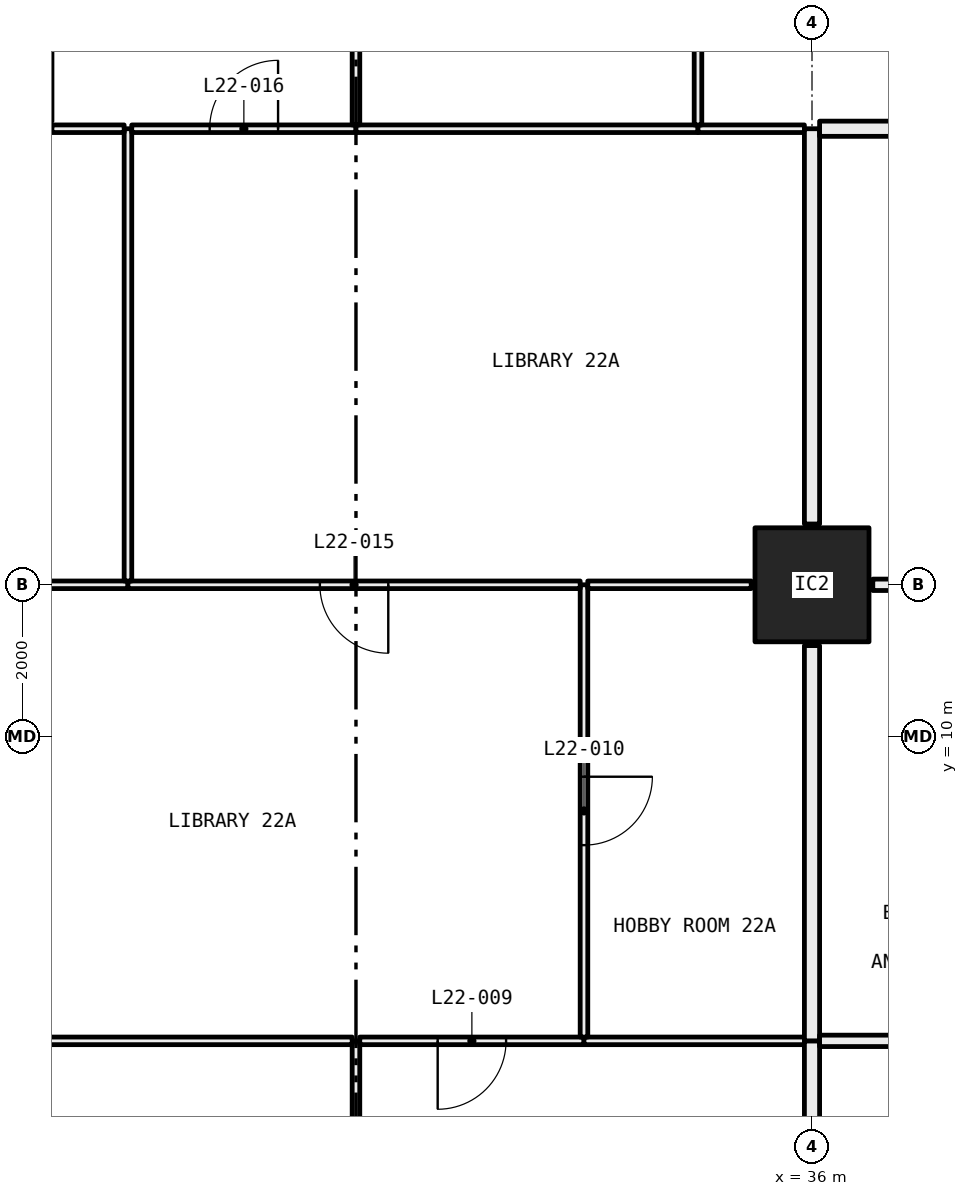
"""IFC4 building model, lengths in metres.
Left out: names, types, materials, properties, quantities, classifications, styles, units other than length and angle.
Written with IfcOpenShell. Run it as: python <this file> out.ifc"""

import sys

from ifc_helpers import new_model, si_unit, direction, frame, frame_2d, origin, origin_2d, place, context, subcontext, project, spatial, rectangle, hollow_rectangle, extrude, element, fill, save


model = new_model("IFC4")
c1 = context("Model", 3, precision=1e-05, world=origin(), true_north=direction((0.0, 1.0)))
c2 = subcontext(c1, "Body", "Model", "MODEL_VIEW")
j1 = project(units=[si_unit("LENGTHUNIT", "METRE"), si_unit("PLANEANGLEUNIT", "RADIAN")], contexts=[c1])
p1 = place(None, origin())
s1 = spatial("IfcSite", under=j1, at=p1, CompositionType="ELEMENT")
p2 = place(p1, origin())
s2 = spatial("IfcBuilding", under=s1, at=p2, CompositionType="ELEMENT")
p3 = place(p2, frame((0.0, 0.0, 88.65)))
s3 = spatial("IfcBuildingStorey", under=s2, at=p3, CompositionType="ELEMENT", Elevation=88.65)
p4 = place(p3, frame((36.0, 12.0, 0.0), z_axis=(0.0, 0.0, 1.0), x_axis=(1.0, 0.0, 0.0)))
e1 = element("IfcColumn", 1, at=p4, inside=s3, PredefinedType="COLUMN", context=c2, shape_type="SweptSolid", body=[
    extrude(hollow_rectangle(XDim=1.5, YDim=1.5, WallThickness=0.065, at=origin_2d()), origin(), (0.0, 0.0, 1.0), 3.05),
])
p5 = place(p3, frame((30.0, 0.72, 0.0), z_axis=(0.0, 0.0, 1.0), x_axis=(0.0, 1.0, 0.0)))
e2 = element("IfcWall", 2, at=p5, inside=s3, PredefinedType="PARTITIONING", context=c2, shape_type="SweptSolid", body=[
    extrude(rectangle(XDim=5.28, YDim=0.1, at=frame_2d((2.64, 0.0))), origin(), (0.0, 0.0, 1.0), 3.05),
])
p6 = place(p3, frame((29.95, 6.0, 0.0), z_axis=(0.0, 0.0, 1.0), x_axis=(-1.0, 0.0, 0.0)))
e3 = element("IfcWall", 3, at=p6, inside=s3, PredefinedType="PARTITIONING", context=c2, shape_type="SweptSolid", body=[
    extrude(rectangle(XDim=5.02, YDim=0.1, at=frame_2d((2.51, 0.0))), origin(), (0.0, 0.0, 1.0), 3.05),
])
p7 = place(p3, frame((33.0, 6.0, 0.0), z_axis=(0.0, 0.0, 1.0), x_axis=(-1.0, 0.0, 0.0)))
e4 = element("IfcWall", 4, at=p7, inside=s3, PredefinedType="PARTITIONING", context=c2, shape_type="SweptSolid", body=[
    extrude(rectangle(XDim=2.95, YDim=0.1, at=frame_2d((1.475, 0.0))), origin(), (0.0, 0.0, 1.0), 3.05),
])
p8 = place(p7, frame((1.025, 0.0, 0.0)))
e5 = element("IfcOpeningElement", 5, at=p8, cuts=e4, PredefinedType="OPENING", context=c2, shape_type="SweptSolid", body=[
    extrude(rectangle(XDim=0.9, YDim=2.1, at=frame_2d((0.45, 1.05))), frame((0.0, 0.06, 0.0), z_axis=(0.0, -1.0, 0.0), x_axis=(1.0, 0.0, 0.0)), (0.0, 0.0, 1.0), 0.12),
])
p9 = place(p3, frame((35.9, 6.0, 0.0), z_axis=(0.0, 0.0, 1.0), x_axis=(-1.0, 0.0, 0.0)))
e6 = element("IfcWall", 6, at=p9, inside=s3, PredefinedType="PARTITIONING", context=c2, shape_type="SweptSolid", body=[
    extrude(rectangle(XDim=2.9, YDim=0.1, at=frame_2d((1.45, 0.0))), origin(), (0.0, 0.0, 1.0), 3.05),
])
p10 = place(p3, frame((36.0, 0.72, 0.0), z_axis=(0.0, 0.0, 1.0), x_axis=(0.0, 1.0, 0.0)))
e7 = element("IfcWall", 7, at=p10, inside=s3, PredefinedType="PARTITIONING", context=c2, shape_type="SweptSolid", body=[
    extrude(rectangle(XDim=5.28, YDim=0.2, at=frame_2d((2.64, 0.0))), origin(), (0.0, 0.0, 1.0), 2.45),
])
p11 = place(p3, frame((33.0, 6.05, 0.0), z_axis=(0.0, 0.0, 1.0), x_axis=(0.0, 1.0, 0.0)))
e8 = element("IfcWall", 8, at=p11, inside=s3, PredefinedType="PARTITIONING", context=c2, shape_type="SweptSolid", body=[
    extrude(rectangle(XDim=5.95, YDim=0.1, at=frame_2d((2.975, 0.0))), origin(), (0.0, 0.0, 1.0), 2.45),
])
p12 = place(p11, frame((2.525, 0.0, 0.0)))
e9 = element("IfcOpeningElement", 9, at=p12, cuts=e8, PredefinedType="OPENING", context=c2, shape_type="SweptSolid", body=[
    extrude(rectangle(XDim=0.9, YDim=2.1, at=frame_2d((0.45, 1.05))), frame((0.0, 0.06, 0.0), z_axis=(0.0, -1.0, 0.0), x_axis=(1.0, 0.0, 0.0)), (0.0, 0.0, 1.0), 0.12),
])
p13 = place(p3, frame((27.0, 12.0, 0.0), z_axis=(0.0, 0.0, 1.0), x_axis=(-1.0, 0.0, 0.0)))
e10 = element("IfcWall", 10, at=p13, inside=s3, PredefinedType="PARTITIONING", context=c2, shape_type="SweptSolid", body=[
    extrude(rectangle(XDim=2.02, YDim=0.1, at=frame_2d((1.01, 0.0))), origin(), (0.0, 0.0, 1.0), 2.45),
])
p14 = place(p3, frame((32.95, 12.0, 0.0), z_axis=(0.0, 0.0, 1.0), x_axis=(-1.0, 0.0, 0.0)))
e11 = element("IfcWall", 11, at=p14, inside=s3, PredefinedType="PARTITIONING", context=c2, shape_type="SweptSolid", body=[
    extrude(rectangle(XDim=5.95, YDim=0.1, at=frame_2d((2.975, 0.0))), origin(), (0.0, 0.0, 1.0), 2.45),
])
p15 = place(p14, frame((2.525, 0.0, 0.0)))
e12 = element("IfcOpeningElement", 12, at=p15, cuts=e11, PredefinedType="OPENING", context=c2, shape_type="SweptSolid", body=[
    extrude(rectangle(XDim=0.9, YDim=2.1, at=frame_2d((0.45, 1.05))), frame((0.0, 0.06, 0.0), z_axis=(0.0, -1.0, 0.0), x_axis=(1.0, 0.0, 0.0)), (0.0, 0.0, 1.0), 0.12),
])
p16 = place(p3, frame((35.2, 12.0, 0.0), z_axis=(0.0, 0.0, 1.0), x_axis=(-1.0, 0.0, 0.0)))
e13 = element("IfcWall", 13, at=p16, inside=s3, PredefinedType="PARTITIONING", context=c2, shape_type="SweptSolid", body=[
    extrude(rectangle(XDim=2.15, YDim=0.1, at=frame_2d((1.075, 0.0))), origin(), (0.0, 0.0, 1.0), 2.45),
])
p17 = place(p3, frame((36.0, 6.0, 0.0), z_axis=(0.0, 0.0, 1.0), x_axis=(0.0, 1.0, 0.0)))
e14 = element("IfcWall", 14, at=p17, inside=s3, PredefinedType="PARTITIONING", context=c2, shape_type="SweptSolid", body=[
    extrude(rectangle(XDim=5.2, YDim=0.2, at=frame_2d((2.6, 0.0))), origin(), (0.0, 0.0, 1.0), 2.45),
])
p18 = place(p3, frame((27.0, 12.05, 0.0), z_axis=(0.0, 0.0, 1.0), x_axis=(0.0, 1.0, 0.0)))
e15 = element("IfcWall", 15, at=p18, inside=s3, PredefinedType="PARTITIONING", context=c2, shape_type="SweptSolid", body=[
    extrude(rectangle(XDim=5.95, YDim=0.1, at=frame_2d((2.975, 0.0))), origin(), (0.0, 0.0, 1.0), 2.45),
])
p19 = place(p3, frame((26.95, 18.0, 0.0), z_axis=(0.0, 0.0, 1.0), x_axis=(-1.0, 0.0, 0.0)))
e16 = element("IfcWall", 16, at=p19, inside=s3, PredefinedType="PARTITIONING", context=c2, shape_type="SweptSolid", body=[
    extrude(rectangle(XDim=0.95, YDim=0.1, at=frame_2d((0.475, 0.0))), origin(), (0.0, 0.0, 1.0), 3.05),
])
p20 = place(p3, frame((30.0, 18.0, 0.0), z_axis=(0.0, 0.0, 1.0), x_axis=(-1.0, 0.0, 0.0)))
e17 = element("IfcWall", 17, at=p20, inside=s3, PredefinedType="PARTITIONING", context=c2, shape_type="SweptSolid", body=[
    extrude(rectangle(XDim=2.95, YDim=0.1, at=frame_2d((1.475, 0.0))), origin(), (0.0, 0.0, 1.0), 3.05),
])
p21 = place(p20, frame((1.025, 0.0, 0.0)))
e18 = element("IfcOpeningElement", 18, at=p21, cuts=e17, PredefinedType="OPENING", context=c2, shape_type="SweptSolid", body=[
    extrude(rectangle(XDim=0.9, YDim=2.1, at=frame_2d((0.45, 1.05))), frame((0.0, 0.06, 0.0), z_axis=(0.0, -1.0, 0.0), x_axis=(1.0, 0.0, 0.0)), (0.0, 0.0, 1.0), 0.12),
])
p22 = place(p3, frame((34.5, 18.0, 0.0), z_axis=(0.0, 0.0, 1.0), x_axis=(-1.0, 0.0, 0.0)))
e19 = element("IfcWall", 19, at=p22, inside=s3, PredefinedType="PARTITIONING", context=c2, shape_type="SweptSolid", body=[
    extrude(rectangle(XDim=4.5, YDim=0.1, at=frame_2d((2.25, 0.0))), origin(), (0.0, 0.0, 1.0), 3.05),
])
p23 = place(p3, frame((35.9, 18.0, 0.0), z_axis=(0.0, 0.0, 1.0), x_axis=(-1.0, 0.0, 0.0)))
e20 = element("IfcWall", 20, at=p23, inside=s3, PredefinedType="PARTITIONING", context=c2, shape_type="SweptSolid", body=[
    extrude(rectangle(XDim=1.4, YDim=0.1, at=frame_2d((0.7, 0.0))), origin(), (0.0, 0.0, 1.0), 3.05),
])
p24 = place(p3, frame((36.0, 12.8, 0.0), z_axis=(0.0, 0.0, 1.0), x_axis=(0.0, 1.0, 0.0)))
e21 = element("IfcWall", 21, at=p24, inside=s3, PredefinedType="PARTITIONING", context=c2, shape_type="SweptSolid", body=[
    extrude(rectangle(XDim=5.2, YDim=0.2, at=frame_2d((2.6, 0.0))), origin(), (0.0, 0.0, 1.0), 2.45),
])
p25 = place(p3, frame((30.0, 18.05, 0.0), z_axis=(0.0, 0.0, 1.0), x_axis=(0.0, 1.0, 0.0)))
e22 = element("IfcWall", 22, at=p25, inside=s3, PredefinedType="PARTITIONING", context=c2, shape_type="SweptSolid", body=[
    extrude(rectangle(XDim=6.175, YDim=0.1, at=frame_2d((3.087, 0.0))), origin(), (0.0, 0.0, 1.0), 2.45),
])
p26 = place(p25, frame((2.637, 0.0, 0.0)))
e23 = element("IfcOpeningElement", 23, at=p26, cuts=e22, PredefinedType="OPENING", context=c2, shape_type="SweptSolid", body=[
    extrude(rectangle(XDim=0.9, YDim=2.1, at=frame_2d((0.45, 1.05))), frame((0.0, 0.06, 0.0), z_axis=(0.0, -1.0, 0.0), x_axis=(1.0, 0.0, 0.0)), (0.0, 0.0, 1.0), 0.12),
])
p27 = place(p3, frame((34.5, 18.05, 0.0), z_axis=(0.0, 0.0, 1.0), x_axis=(0.0, 1.0, 0.0)))
e24 = element("IfcWall", 24, at=p27, inside=s3, PredefinedType="PARTITIONING", context=c2, shape_type="SweptSolid", body=[
    extrude(rectangle(XDim=6.25, YDim=0.1, at=frame_2d((3.125, 0.0))), origin(), (0.0, 0.0, 1.0), 2.45),
])
p28 = place(p27, frame((2.675, 0.0, 0.0)))
e25 = element("IfcOpeningElement", 25, at=p28, cuts=e24, PredefinedType="OPENING", context=c2, shape_type="SweptSolid", body=[
    extrude(rectangle(XDim=0.9, YDim=2.1, at=frame_2d((0.45, 1.05))), frame((0.0, 0.06, 0.0), z_axis=(0.0, -1.0, 0.0), x_axis=(1.0, 0.0, 0.0)), (0.0, 0.0, 1.0), 0.12),
])
p29 = place(p3, frame((36.1, 18.0, 0.0), z_axis=(0.0, 0.0, 1.0), x_axis=(1.0, 0.0, 0.0)))
e26 = element("IfcWall", 26, at=p29, inside=s3, PredefinedType="PARTITIONING", context=c2, shape_type="SweptSolid", body=[
    extrude(rectangle(XDim=2.3, YDim=0.2, at=frame_2d((1.15, 0.0))), origin(), (0.0, 0.0, 1.0), 3.05),
])
p30 = place(p3, frame((39.0, 6.0, 0.0), z_axis=(0.0, 0.0, 1.0), x_axis=(-1.0, 0.0, 0.0)))
e27 = element("IfcWall", 27, at=p30, inside=s3, PredefinedType="PARTITIONING", context=c2, shape_type="SweptSolid", body=[
    extrude(rectangle(XDim=2.9, YDim=0.15, at=frame_2d((1.45, 0.0))), origin(), (0.0, 0.0, 1.0), 3.05),
])
p31 = place(p3, frame((38.925, 12.0, 0.0), z_axis=(0.0, 0.0, 1.0), x_axis=(-1.0, 0.0, 0.0)))
e28 = element("IfcWall", 28, at=p31, inside=s3, PredefinedType="PARTITIONING", context=c2, shape_type="SweptSolid", body=[
    extrude(rectangle(XDim=2.125, YDim=0.15, at=frame_2d((1.062, 0.0))), origin(), (0.0, 0.0, 1.0), 2.45),
])
p32 = place(p8, origin())
e29 = element("IfcDoor", 29, at=p32, inside=s3, OperationType="SINGLE_SWING_LEFT", PredefinedType="DOOR", context=c2, shape_type="SweptSolid", body=[
    extrude(rectangle(XDim=0.9, YDim=2.1, at=frame_2d((0.45, 1.05))), frame((0.0, 0.025, 0.0), z_axis=(0.0, -1.0, 0.0), x_axis=(1.0, 0.0, 0.0)), (0.0, 0.0, 1.0), 0.05),
])
fill(e5, e29)
p33 = place(p12, frame((0.9, 0.0, 0.0), x_axis=(-1.0, 0.0, 0.0)))
e30 = element("IfcDoor", 30, at=p33, inside=s3, OperationType="SINGLE_SWING_RIGHT", PredefinedType="DOOR", context=c2, shape_type="SweptSolid", body=[
    extrude(rectangle(XDim=0.9, YDim=2.1, at=frame_2d((0.45, 1.05))), frame((0.0, 0.025, 0.0), z_axis=(0.0, -1.0, 0.0), x_axis=(1.0, 0.0, 0.0)), (0.0, 0.0, 1.0), 0.05),
])
fill(e9, e30)
p34 = place(p15, origin())
e31 = element("IfcDoor", 31, at=p34, inside=s3, OperationType="SINGLE_SWING_RIGHT", PredefinedType="DOOR", context=c2, shape_type="SweptSolid", body=[
    extrude(rectangle(XDim=0.9, YDim=2.1, at=frame_2d((0.45, 1.05))), frame((0.0, 0.025, 0.0), z_axis=(0.0, -1.0, 0.0), x_axis=(1.0, 0.0, 0.0)), (0.0, 0.0, 1.0), 0.05),
])
fill(e12, e31)
p35 = place(p21, frame((0.9, 0.0, 0.0), x_axis=(-1.0, 0.0, 0.0)))
e32 = element("IfcDoor", 32, at=p35, inside=s3, OperationType="SINGLE_SWING_LEFT", PredefinedType="DOOR", context=c2, shape_type="SweptSolid", body=[
    extrude(rectangle(XDim=0.9, YDim=2.1, at=frame_2d((0.45, 1.05))), frame((0.0, 0.025, 0.0), z_axis=(0.0, -1.0, 0.0), x_axis=(1.0, 0.0, 0.0)), (0.0, 0.0, 1.0), 0.05),
])
fill(e18, e32)
save(model, sys.argv[1])
